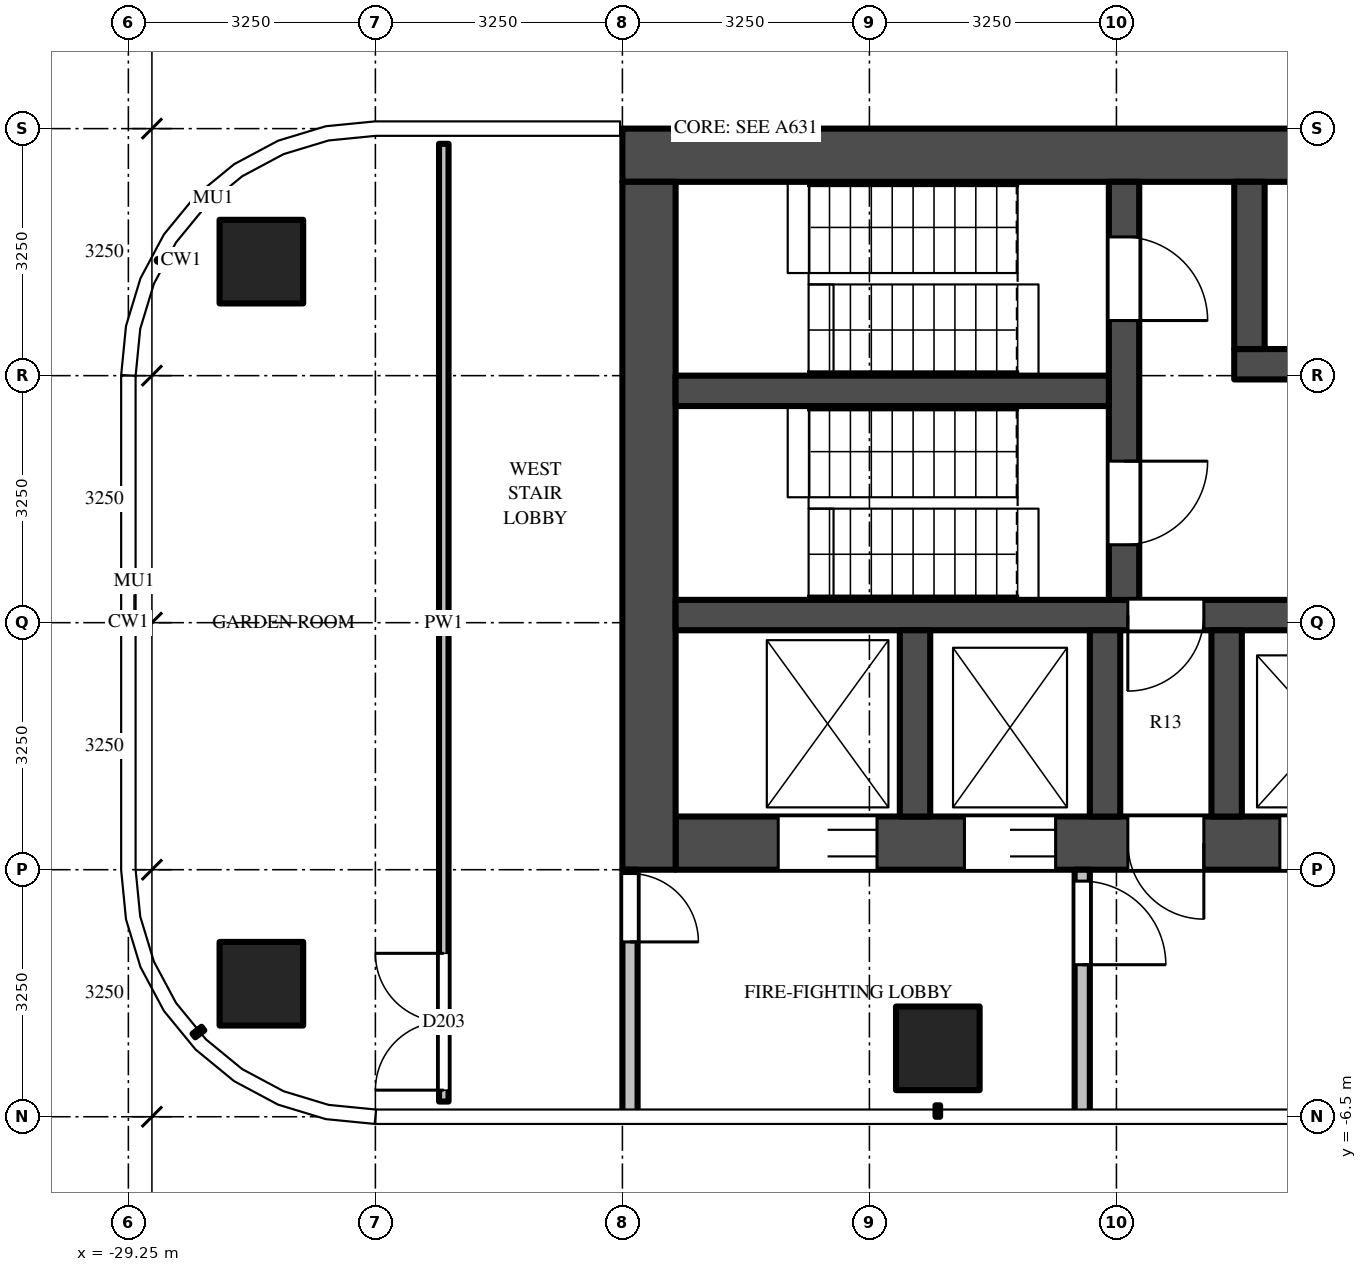
"""IFC4 building model, lengths in metres.
Left out: names, types, materials, properties, quantities, classifications, styles, units other than length and angle.
Written with IfcOpenShell. Run it as: python <this file> out.ifc"""

import sys

from ifc_helpers import new_model, si_unit, direction, frame, frame_2d, origin, origin_2d, place, context, subcontext, project, spatial, rectangle, extrude, source, transform, mapped, element, fill, save


model = new_model("IFC4")
c1 = context("Model", 3, precision=1e-05, world=origin(), true_north=direction((0.0, 1.0)))
c2 = subcontext(c1, "Body", "Model", "MODEL_VIEW")
j1 = project(units=[si_unit("LENGTHUNIT", "METRE"), si_unit("PLANEANGLEUNIT", "RADIAN")], contexts=[c1])
p1 = place(None, origin())
s1 = spatial("IfcSite", under=j1, at=p1, CompositionType="ELEMENT")
p2 = place(p1, origin())
s2 = spatial("IfcBuilding", under=s1, at=p2, CompositionType="ELEMENT")
p3 = place(p2, frame((0.0, 0.0, 248.0)))
s3 = spatial("IfcBuildingStorey", under=s2, at=p3, CompositionType="ELEMENT", Elevation=248.0)
m1 = source(origin(), c2, "Body", "SweptSolid", [
    extrude(rectangle(XDim=1.1, YDim=1.1, at=origin_2d()), origin(), (0.0, 0.0, 1.0), 3.9),
])
for number, where, z_axis, x_axis in (
    (1, (-18.6, -5.6, 0.0), (0.0, 0.0, 1.0), (1.0, 0.0, 0.0)),
    (2, (-27.5, -4.75, 0.0), (0.0, 0.0, 1.0), (1.0, 0.0, 0.0)),
    (3, (-27.5, 4.75, 0.0), (0.0, 0.0, 1.0), (1.0, 0.0, 0.0)),
):
    element("IfcColumn", number, at=place(p3, frame(where, z_axis=z_axis, x_axis=x_axis)), inside=s3, PredefinedType="COLUMN", context=c2, shape_type="MappedRepresentation", body=[
        mapped(m1, transform((0.0, 0.0, 0.0))),
    ])
m2 = source(origin(), c2, "Body", "SweptSolid", [
    extrude(rectangle(XDim=16.6, YDim=0.7, at=frame_2d((8.3, 0.0))), origin(), (0.0, 0.0, 1.0), 3.7),
])
p4 = place(p3, frame((-6.15, 6.15, 0.0), z_axis=(0.0, 0.0, 1.0), x_axis=(-1.0, 0.0, 0.0)))
e4 = element("IfcWall", 4, at=p4, inside=s3, PredefinedType="SHEAR", context=c2, shape_type="MappedRepresentation", body=[
    mapped(m2, transform((0.0, 0.0, 0.0))),
])
m3 = source(origin(), c2, "Body", "SweptSolid", [
    extrude(rectangle(XDim=14.85, YDim=0.7, at=frame_2d((7.425, 0.0))), origin(), (0.0, 0.0, 1.0), 3.7),
])
p5 = place(p3, frame((-7.2, -2.9, 0.0), z_axis=(0.0, 0.0, 1.0), x_axis=(-1.0, 0.0, 0.0)))
e5 = element("IfcWall", 5, at=p5, inside=s3, PredefinedType="SHEAR", context=c2, shape_type="MappedRepresentation", body=[
    mapped(m3, transform((0.0, 0.0, 0.0))),
])
m4 = source(origin(), c2, "Body", "SweptSolid", [
    extrude(rectangle(XDim=1.1, YDim=2.1, at=frame_2d((0.55, 1.05))), frame((0.0, 0.36, 0.0), z_axis=(0.0, -1.0, 0.0), x_axis=(1.0, 0.0, 0.0)), (0.0, 0.0, 1.0), 0.72),
])
p6 = place(p5, frame((0.55, 0.0, 0.0)))
e6 = element("IfcOpeningElement", 6, at=p6, cuts=e5, PredefinedType="OPENING", context=c2, shape_type="MappedRepresentation", body=[
    mapped(m4, transform((0.0, 0.0, 0.0))),
])
p7 = place(p5, frame((3.15, 0.0, 0.0)))
e7 = element("IfcOpeningElement", 7, at=p7, cuts=e5, PredefinedType="OPENING", context=c2, shape_type="MappedRepresentation", body=[
    mapped(m4, transform((0.0, 0.0, 0.0))),
])
m5 = source(origin(), c2, "Body", "SweptSolid", [
    extrude(rectangle(XDim=1.2, YDim=2.1, at=frame_2d((0.6, 1.05))), frame((0.0, 0.36, 0.0), z_axis=(0.0, -1.0, 0.0), x_axis=(1.0, 0.0, 0.0)), (0.0, 0.0, 1.0), 0.72),
])
p8 = place(p5, frame((5.7, 0.0, 0.0)))
e8 = element("IfcOpeningElement", 8, at=p8, cuts=e5, PredefinedType="OPENING", context=c2, shape_type="MappedRepresentation", body=[
    mapped(m5, transform((0.0, 0.0, 0.0))),
])
m6 = source(origin(), c2, "Body", "SweptSolid", [
    extrude(rectangle(XDim=1.3, YDim=2.1, at=frame_2d((0.65, 1.05))), frame((0.0, 0.36, 0.0), z_axis=(0.0, -1.0, 0.0), x_axis=(1.0, 0.0, 0.0)), (0.0, 0.0, 1.0), 0.72),
])
p9 = place(p5, frame((12.2, 0.0, 0.0)))
e9 = element("IfcOpeningElement", 9, at=p9, cuts=e5, PredefinedType="OPENING", context=c2, shape_type="MappedRepresentation", body=[
    mapped(m6, transform((0.0, 0.0, 0.0))),
])
p10 = place(p5, frame((9.85, 0.0, 0.0)))
e10 = element("IfcOpeningElement", 10, at=p10, cuts=e5, PredefinedType="OPENING", context=c2, shape_type="MappedRepresentation", body=[
    mapped(m5, transform((0.0, 0.0, 0.0))),
])
m7 = source(origin(), c2, "Body", "SweptSolid", [
    extrude(rectangle(XDim=1.0, YDim=2.1, at=frame_2d((0.5, 1.05))), frame((0.0, 0.36, 0.0), z_axis=(0.0, -1.0, 0.0), x_axis=(1.0, 0.0, 0.0)), (0.0, 0.0, 1.0), 0.72),
])
p11 = place(p5, frame((7.9, 0.0, 0.0)))
e11 = element("IfcOpeningElement", 11, at=p11, cuts=e5, PredefinedType="OPENING", context=c2, shape_type="MappedRepresentation", body=[
    mapped(m7, transform((0.0, 0.0, 0.0))),
])
m8 = source(origin(), c2, "Body", "SweptSolid", [
    extrude(rectangle(XDim=9.05, YDim=0.7, at=frame_2d((4.525, 0.0))), origin(), (0.0, 0.0, 1.0), 3.7),
])
p12 = place(p3, frame((-22.4, 5.8, 0.0), z_axis=(0.0, 0.0, 1.0), x_axis=(0.0, -1.0, 0.0)))
e12 = element("IfcWall", 12, at=p12, inside=s3, PredefinedType="SHEAR", context=c2, shape_type="MappedRepresentation", body=[
    mapped(m8, transform((0.0, 0.0, 0.0))),
])
m9 = source(origin(), c2, "Body", "SweptSolid", [
    extrude(rectangle(XDim=7.5, YDim=0.4, at=frame_2d((3.75, 0.0))), origin(), (0.0, 0.0, 1.0), 3.7),
])
p13 = place(p3, frame((-7.2, 3.4, 0.0), z_axis=(0.0, 0.0, 1.0), x_axis=(-1.0, 0.0, 0.0)))
e13 = element("IfcWall", 13, at=p13, inside=s3, PredefinedType="SHEAR", context=c2, shape_type="MappedRepresentation", body=[
    mapped(m9, transform((0.0, 0.0, 0.0))),
])
m10 = source(origin(), c2, "Body", "SweptSolid", [
    extrude(rectangle(XDim=0.8, YDim=2.1, at=frame_2d((0.4, 1.05))), frame((0.0, 0.21, 0.0), z_axis=(0.0, -1.0, 0.0), x_axis=(1.0, 0.0, 0.0)), (0.0, 0.0, 1.0), 0.42),
])
p14 = place(p13, frame((0.212, 0.0, 0.0)))
e14 = element("IfcOpeningElement", 14, at=p14, cuts=e13, PredefinedType="OPENING", context=c2, shape_type="MappedRepresentation", body=[
    mapped(m10, transform((0.0, 0.0, 0.0))),
])
m11 = source(origin(), c2, "Body", "SweptSolid", [
    extrude(rectangle(XDim=0.9, YDim=2.1, at=frame_2d((0.45, 1.05))), frame((0.0, 0.21, 0.0), z_axis=(0.0, -1.0, 0.0), x_axis=(1.0, 0.0, 0.0)), (0.0, 0.0, 1.0), 0.42),
])
p15 = place(p13, frame((1.75, 0.0, 0.0)))
e15 = element("IfcOpeningElement", 15, at=p15, cuts=e13, PredefinedType="OPENING", context=c2, shape_type="MappedRepresentation", body=[
    mapped(m11, transform((0.0, 0.0, 0.0))),
])
m12 = source(origin(), c2, "Body", "SweptSolid", [
    extrude(rectangle(XDim=1.0, YDim=2.1, at=frame_2d((0.5, 1.05))), frame((0.0, 0.21, 0.0), z_axis=(0.0, -1.0, 0.0), x_axis=(1.0, 0.0, 0.0)), (0.0, 0.0, 1.0), 0.42),
])
p16 = place(p13, frame((4.637, 0.0, 0.0)))
e16 = element("IfcOpeningElement", 16, at=p16, cuts=e13, PredefinedType="OPENING", context=c2, shape_type="MappedRepresentation", body=[
    mapped(m12, transform((0.0, 0.0, 0.0))),
])
m13 = source(origin(), c2, "Body", "SweptSolid", [
    extrude(rectangle(XDim=14.85, YDim=0.4, at=frame_2d((7.425, 0.0))), origin(), (0.0, 0.0, 1.0), 3.7),
])
p17 = place(p3, frame((-7.2, 0.1, 0.0), z_axis=(0.0, 0.0, 1.0), x_axis=(-1.0, 0.0, 0.0)))
e17 = element("IfcWall", 17, at=p17, inside=s3, PredefinedType="SHEAR", context=c2, shape_type="MappedRepresentation", body=[
    mapped(m13, transform((0.0, 0.0, 0.0))),
])
p18 = place(p17, frame((7.9, 0.0, 0.0)))
e18 = element("IfcOpeningElement", 18, at=p18, cuts=e17, PredefinedType="OPENING", context=c2, shape_type="MappedRepresentation", body=[
    mapped(m12, transform((0.0, 0.0, 0.0))),
])
m14 = source(origin(), c2, "Body", "SweptSolid", [
    extrude(rectangle(XDim=5.5, YDim=0.4, at=frame_2d((2.75, 0.0))), origin(), (0.0, 0.0, 1.0), 3.7),
])
p19 = place(p3, frame((-16.15, 5.8, 0.0), z_axis=(0.0, 0.0, 1.0), x_axis=(0.0, -1.0, 0.0)))
e19 = element("IfcWall", 19, at=p19, inside=s3, PredefinedType="SHEAR", context=c2, shape_type="MappedRepresentation", body=[
    mapped(m14, transform((0.0, 0.0, 0.0))),
])
m15 = source(origin(), c2, "Body", "SweptSolid", [
    extrude(rectangle(XDim=1.1, YDim=2.1, at=frame_2d((0.55, 1.05))), frame((0.0, 0.21, 0.0), z_axis=(0.0, -1.0, 0.0), x_axis=(1.0, 0.0, 0.0)), (0.0, 0.0, 1.0), 0.42),
])
p20 = place(p19, frame((0.725, 0.0, 0.0)))
e20 = element("IfcOpeningElement", 20, at=p20, cuts=e19, PredefinedType="OPENING", context=c2, shape_type="MappedRepresentation", body=[
    mapped(m15, transform((0.0, 0.0, 0.0))),
])
p21 = place(p19, frame((3.675, 0.0, 0.0)))
e21 = element("IfcOpeningElement", 21, at=p21, cuts=e19, PredefinedType="OPENING", context=c2, shape_type="MappedRepresentation", body=[
    mapped(m15, transform((0.0, 0.0, 0.0))),
])
m16 = source(origin(), c2, "Body", "SweptSolid", [
    extrude(rectangle(XDim=5.7, YDim=0.4, at=frame_2d((2.85, 0.0))), origin(), (0.0, 0.0, 1.0), 3.7),
])
p22 = place(p3, frame((-16.35, 3.05, 0.0), z_axis=(0.0, 0.0, 1.0), x_axis=(-1.0, 0.0, 0.0)))
e22 = element("IfcWall", 22, at=p22, inside=s3, PredefinedType="SHEAR", context=c2, shape_type="MappedRepresentation", body=[
    mapped(m16, transform((0.0, 0.0, 0.0))),
])
m17 = source(origin(), c2, "Body", "SweptSolid", [
    extrude(rectangle(XDim=2.2, YDim=0.4, at=frame_2d((1.1, 0.0))), origin(), (0.0, 0.0, 1.0), 3.7),
])
p23 = place(p3, frame((-14.5, 5.8, 0.0), z_axis=(0.0, 0.0, 1.0), x_axis=(0.0, -1.0, 0.0)))
e23 = element("IfcWall", 23, at=p23, inside=s3, PredefinedType="SHEAR", context=c2, shape_type="MappedRepresentation", body=[
    mapped(m17, transform((0.0, 0.0, 0.0))),
])
m18 = source(origin(), c2, "Body", "SweptSolid", [
    extrude(rectangle(XDim=2.45, YDim=0.4, at=frame_2d((1.225, 0.0))), origin(), (0.0, 0.0, 1.0), 3.7),
])
for number, where, z_axis, x_axis in (
    (24, (-14.8, -0.1, 0.0), (0.0, 0.0, 1.0), (0.0, -1.0, 0.0)),
    (25, (-16.4, -0.1, 0.0), (0.0, 0.0, 1.0), (0.0, -1.0, 0.0)),
    (26, (-18.9, -0.1, 0.0), (0.0, 0.0, 1.0), (0.0, -1.0, 0.0)),
):
    element("IfcWall", number, at=place(p3, frame(where, z_axis=z_axis, x_axis=x_axis)), inside=s3, PredefinedType="SHEAR", context=c2, shape_type="MappedRepresentation", body=[
        mapped(m18, transform((0.0, 0.0, 0.0))),
    ])
m19 = source(origin(), c2, "Body", "SweptSolid", [
    extrude(rectangle(XDim=3.25, YDim=0.2, at=frame_2d((1.625, 0.0))), origin(), (0.0, 0.0, 1.0), 3.7),
])
p24 = place(p3, frame((-16.7, -3.25, 0.0), z_axis=(0.0, 0.0, 1.0), x_axis=(0.0, -1.0, 0.0)))
e27 = element("IfcWall", 27, at=p24, inside=s3, PredefinedType="PARTITIONING", context=c2, shape_type="MappedRepresentation", body=[
    mapped(m19, transform((0.0, 0.0, 0.0))),
])
m20 = source(origin(), c2, "Body", "SweptSolid", [
    extrude(rectangle(XDim=1.1, YDim=2.1, at=frame_2d((0.55, 1.05))), frame((0.0, 0.11, 0.0), z_axis=(0.0, -1.0, 0.0), x_axis=(1.0, 0.0, 0.0)), (0.0, 0.0, 1.0), 0.22),
])
p25 = place(p24, frame((0.15, 0.0, 0.0)))
e28 = element("IfcOpeningElement", 28, at=p25, cuts=e27, PredefinedType="OPENING", context=c2, shape_type="MappedRepresentation", body=[
    mapped(m20, transform((0.0, 0.0, 0.0))),
])
p26 = place(p3, frame((-22.65, -3.25, 0.0), z_axis=(0.0, 0.0, 1.0), x_axis=(0.0, -1.0, 0.0)))
e29 = element("IfcWall", 29, at=p26, inside=s3, PredefinedType="PARTITIONING", context=c2, shape_type="MappedRepresentation", body=[
    mapped(m19, transform((0.0, 0.0, 0.0))),
])
m21 = source(origin(), c2, "Body", "SweptSolid", [
    extrude(rectangle(XDim=0.9, YDim=2.1, at=frame_2d((0.45, 1.05))), frame((0.0, 0.11, 0.0), z_axis=(0.0, -1.0, 0.0), x_axis=(1.0, 0.0, 0.0)), (0.0, 0.0, 1.0), 0.22),
])
p27 = place(p26, frame((0.05, 0.0, 0.0)))
e30 = element("IfcOpeningElement", 30, at=p27, cuts=e29, PredefinedType="OPENING", context=c2, shape_type="MappedRepresentation", body=[
    mapped(m21, transform((0.0, 0.0, 0.0))),
])
m22 = source(origin(), c2, "Body", "SweptSolid", [
    extrude(rectangle(XDim=12.6, YDim=0.125, at=frame_2d((6.3, 0.0))), origin(), (0.0, 0.0, 1.0), 2.78),
])
p28 = place(p3, frame((-25.1, -6.3, 0.0), z_axis=(0.0, 0.0, 1.0), x_axis=(0.0, 1.0, 0.0)))
e31 = element("IfcWall", 31, at=p28, inside=s3, PredefinedType="PARTITIONING", context=c2, shape_type="MappedRepresentation", body=[
    mapped(m22, transform((0.0, 0.0, 0.0))),
])
m23 = source(origin(), c2, "Body", "SweptSolid", [
    extrude(rectangle(XDim=1.8, YDim=2.1, at=frame_2d((0.9, 1.05))), frame((0.0, 0.073, 0.0), z_axis=(0.0, -1.0, 0.0), x_axis=(1.0, 0.0, 0.0)), (0.0, 0.0, 1.0), 0.145),
])
p29 = place(p28, frame((0.15, 0.0, 0.0)))
e32 = element("IfcOpeningElement", 32, at=p29, cuts=e31, PredefinedType="OPENING", context=c2, shape_type="MappedRepresentation", body=[
    mapped(m23, transform((0.0, 0.0, 0.0))),
])
m24 = source(origin(), c2, "Body", "SweptSolid", [
    extrude(rectangle(XDim=1.2, YDim=2.1, at=frame_2d((0.6, 1.05))), frame((0.0, -0.275, 0.0), z_axis=(0.0, -1.0, 0.0), x_axis=(1.0, 0.0, 0.0)), (0.0, 0.0, 1.0), 0.05),
])
p30 = place(p8, origin())
e33 = element("IfcDoor", 33, at=p30, inside=s3, OperationType="DOUBLE_DOOR_SLIDING", PredefinedType="DOOR", context=c2, shape_type="MappedRepresentation", body=[
    mapped(m24, transform((0.0, 0.0, 0.0))),
])
fill(e8, e33)
m25 = source(origin(), c2, "Body", "SweptSolid", [
    extrude(rectangle(XDim=1.3, YDim=2.1, at=frame_2d((0.65, 1.05))), frame((0.0, -0.275, 0.0), z_axis=(0.0, -1.0, 0.0), x_axis=(1.0, 0.0, 0.0)), (0.0, 0.0, 1.0), 0.05),
])
p31 = place(p9, origin())
e34 = element("IfcDoor", 34, at=p31, inside=s3, OperationType="DOUBLE_DOOR_SLIDING", PredefinedType="DOOR", context=c2, shape_type="MappedRepresentation", body=[
    mapped(m25, transform((0.0, 0.0, 0.0))),
])
fill(e9, e34)
p32 = place(p10, origin())
e35 = element("IfcDoor", 35, at=p32, inside=s3, OperationType="DOUBLE_DOOR_SLIDING", PredefinedType="DOOR", context=c2, shape_type="MappedRepresentation", body=[
    mapped(m24, transform((0.0, 0.0, 0.0))),
])
fill(e10, e35)
m26 = source(origin(), c2, "Body", "SweptSolid", [
    extrude(rectangle(XDim=1.1, YDim=2.1, at=frame_2d((0.55, 1.05))), frame((0.0, 0.025, 0.0), z_axis=(0.0, -1.0, 0.0), x_axis=(1.0, 0.0, 0.0)), (0.0, 0.0, 1.0), 0.05),
])
p33 = place(p20, origin())
e36 = element("IfcDoor", 36, at=p33, inside=s3, OperationType="SINGLE_SWING_RIGHT", PredefinedType="DOOR", context=c2, shape_type="MappedRepresentation", body=[
    mapped(m26, transform((0.0, 0.0, 0.0))),
])
fill(e20, e36)
p34 = place(p21, origin())
e37 = element("IfcDoor", 37, at=p34, inside=s3, OperationType="SINGLE_SWING_LEFT", PredefinedType="DOOR", context=c2, shape_type="MappedRepresentation", body=[
    mapped(m26, transform((0.0, 0.0, 0.0))),
])
fill(e21, e37)
m27 = source(origin(), c2, "Body", "SweptSolid", [
    extrude(rectangle(XDim=1.0, YDim=2.1, at=frame_2d((0.5, 1.05))), frame((0.0, 0.025, 0.0), z_axis=(0.0, -1.0, 0.0), x_axis=(1.0, 0.0, 0.0)), (0.0, 0.0, 1.0), 0.05),
])
p35 = place(p18, origin())
e38 = element("IfcDoor", 38, at=p35, inside=s3, OperationType="SINGLE_SWING_RIGHT", PredefinedType="DOOR", context=c2, shape_type="MappedRepresentation", body=[
    mapped(m27, transform((0.0, 0.0, 0.0))),
])
fill(e18, e38)
m28 = source(origin(), c2, "Body", "SweptSolid", [
    extrude(rectangle(XDim=1.0, YDim=2.1, at=frame_2d((0.5, 1.05))), frame((0.0, -0.275, 0.0), z_axis=(0.0, -1.0, 0.0), x_axis=(1.0, 0.0, 0.0)), (0.0, 0.0, 1.0), 0.05),
])
p36 = place(p11, origin())
e39 = element("IfcDoor", 39, at=p36, inside=s3, OperationType="SINGLE_SWING_LEFT", PredefinedType="DOOR", context=c2, shape_type="MappedRepresentation", body=[
    mapped(m28, transform((0.0, 0.0, 0.0))),
])
fill(e11, e39)
p37 = place(p25, origin())
e40 = element("IfcDoor", 40, at=p37, inside=s3, OperationType="SINGLE_SWING_RIGHT", PredefinedType="DOOR", context=c2, shape_type="MappedRepresentation", body=[
    mapped(m26, transform((0.0, 0.0, 0.0))),
])
fill(e28, e40)
m29 = source(origin(), c2, "Body", "SweptSolid", [
    extrude(rectangle(XDim=0.9, YDim=2.1, at=frame_2d((0.45, 1.05))), frame((0.0, 0.025, 0.0), z_axis=(0.0, -1.0, 0.0), x_axis=(1.0, 0.0, 0.0)), (0.0, 0.0, 1.0), 0.05),
])
p38 = place(p27, origin())
e41 = element("IfcDoor", 41, at=p38, inside=s3, OperationType="SINGLE_SWING_RIGHT", PredefinedType="DOOR", context=c2, shape_type="MappedRepresentation", body=[
    mapped(m29, transform((0.0, 0.0, 0.0))),
])
fill(e30, e41)
m30 = source(origin(), c2, "Body", "SweptSolid", [
    extrude(rectangle(XDim=1.8, YDim=2.1, at=frame_2d((0.9, 1.05))), frame((0.0, 0.025, 0.0), z_axis=(0.0, -1.0, 0.0), x_axis=(1.0, 0.0, 0.0)), (0.0, 0.0, 1.0), 0.05),
])
p39 = place(p29, origin())
e42 = element("IfcDoor", 42, at=p39, inside=s3, OperationType="DOUBLE_DOOR_SINGLE_SWING", PredefinedType="DOOR", context=c2, shape_type="MappedRepresentation", body=[
    mapped(m30, transform((0.0, 0.0, 0.0))),
])
fill(e32, e42)
save(model, sys.argv[1])
